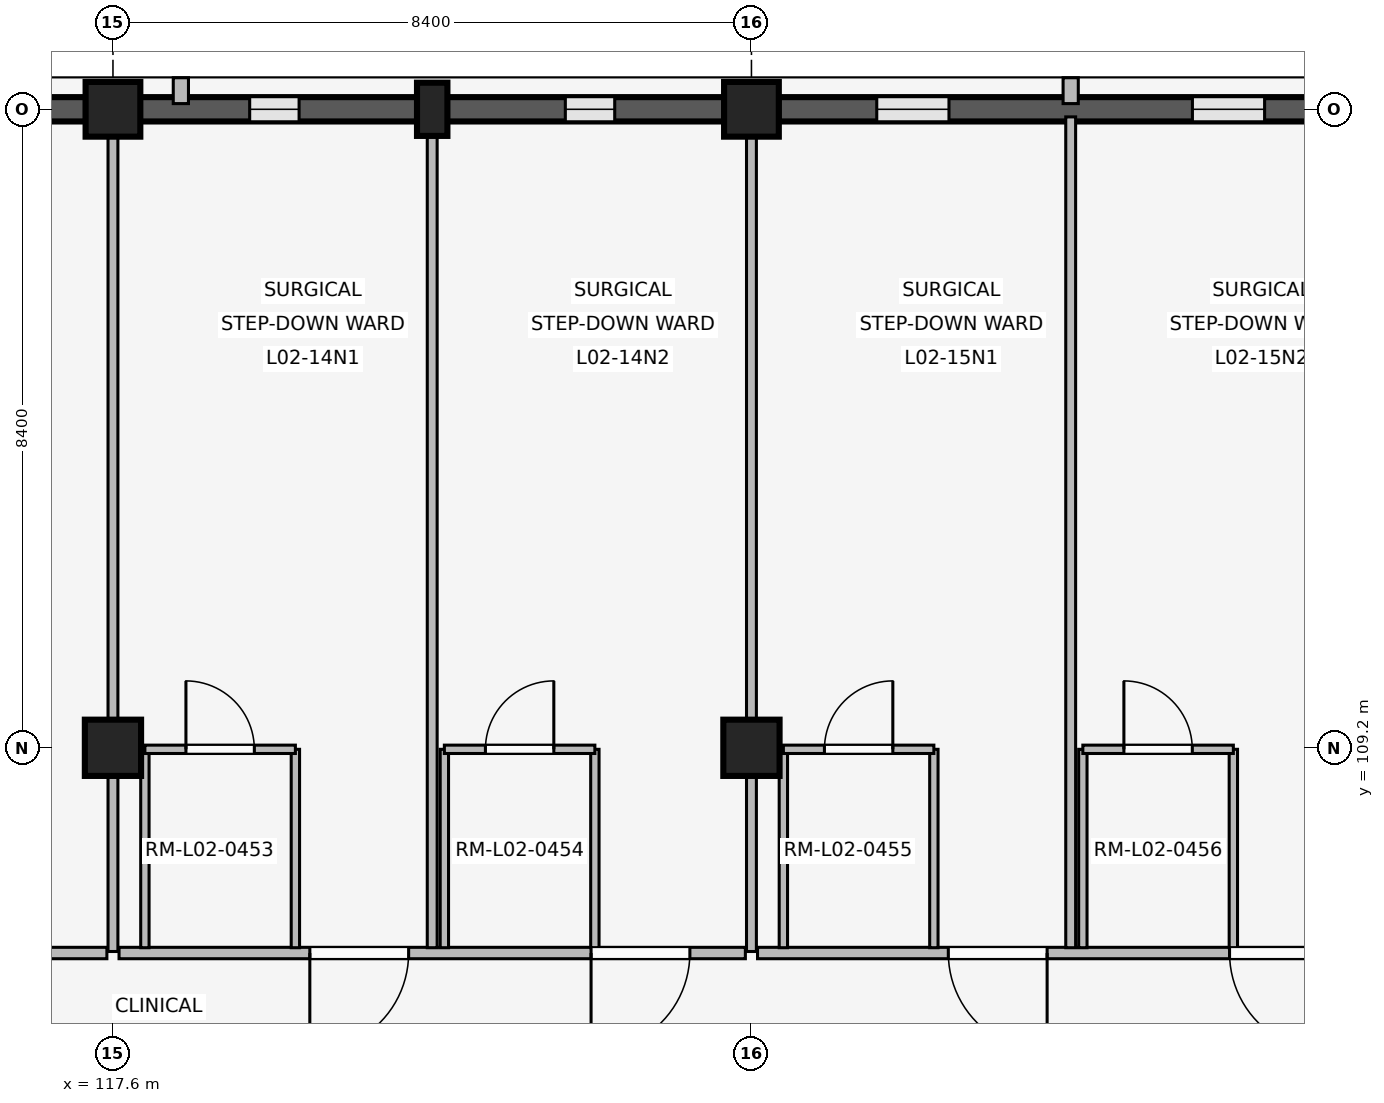
"""IFC4 building model, lengths in metres.
Left out: names, types, materials, properties, quantities, classifications, styles, units other than length and angle.
Written with IfcOpenShell. Run it as: python <this file> out.ifc"""

import sys

from ifc_helpers import new_model, si_unit, direction, frame, frame_2d, origin, origin_2d, place, context, subcontext, project, spatial, rectangle, extrude, element, fill, save


model = new_model("IFC4")
c1 = context("Model", 3, precision=1e-05, world=origin(), true_north=direction((0.0, 1.0)))
c2 = subcontext(c1, "Body", "Model", "MODEL_VIEW")
j1 = project(units=[si_unit("LENGTHUNIT", "METRE"), si_unit("PLANEANGLEUNIT", "RADIAN")], contexts=[c1])
p1 = place(None, origin())
s1 = spatial("IfcSite", under=j1, at=p1, CompositionType="ELEMENT")
p2 = place(p1, origin())
s2 = spatial("IfcBuilding", under=s1, at=p2, CompositionType="ELEMENT")
p3 = place(p2, frame((0.0, 0.0, 8.1)))
s3 = spatial("IfcBuildingStorey", under=s2, at=p3, CompositionType="ELEMENT", Elevation=8.1)
p4 = place(p3, frame((117.6, 109.2, 0.0), z_axis=(0.0, 0.0, 1.0), x_axis=(1.0, 0.0, 0.0)))
e1 = element("IfcColumn", 1, at=p4, inside=s3, PredefinedType="COLUMN", context=c2, shape_type="SweptSolid", body=[
    extrude(rectangle(XDim=0.74, YDim=0.74, at=origin_2d()), origin(), (0.0, 0.0, 1.0), 4.8),
])
p5 = place(p3, frame((117.6, 117.6, 0.0), z_axis=(0.0, 0.0, 1.0), x_axis=(1.0, 0.0, 0.0)))
e2 = element("IfcColumn", 2, at=p5, inside=s3, PredefinedType="COLUMN", context=c2, shape_type="SweptSolid", body=[
    extrude(rectangle(XDim=0.72, YDim=0.72, at=origin_2d()), origin(), (0.0, 0.0, 1.0), 4.8),
])
p6 = place(p3, frame((126.0, 109.2, 0.0), z_axis=(0.0, 0.0, 1.0), x_axis=(1.0, 0.0, 0.0)))
e3 = element("IfcColumn", 3, at=p6, inside=s3, PredefinedType="COLUMN", context=c2, shape_type="SweptSolid", body=[
    extrude(rectangle(XDim=0.74, YDim=0.74, at=origin_2d()), origin(), (0.0, 0.0, 1.0), 4.8),
])
p7 = place(p3, frame((126.0, 117.6, 0.0), z_axis=(0.0, 0.0, 1.0), x_axis=(1.0, 0.0, 0.0)))
e4 = element("IfcColumn", 4, at=p7, inside=s3, PredefinedType="COLUMN", context=c2, shape_type="SweptSolid", body=[
    extrude(rectangle(XDim=0.72, YDim=0.72, at=origin_2d()), origin(), (0.0, 0.0, 1.0), 4.8),
])
p8 = place(p3, frame((121.8, 117.6, 0.0), z_axis=(0.0, 0.0, 1.0), x_axis=(1.0, 0.0, 0.0)))
e5 = element("IfcColumn", 5, at=p8, inside=s3, PredefinedType="PILASTER", context=c2, shape_type="SweptSolid", body=[
    extrude(rectangle(XDim=0.4, YDim=0.7, at=origin_2d()), origin(), (0.0, 0.0, 1.0), 4.8),
])
p9 = place(p3, frame((109.555, 117.6, 0.0), z_axis=(0.0, 0.0, 1.0), x_axis=(1.0, 0.0, 0.0)))
e6 = element("IfcWall", 6, at=p9, inside=s3, PredefinedType="SOLIDWALL", context=c2, shape_type="SweptSolid", body=[
    extrude(rectangle(XDim=7.69, YDim=0.32, at=frame_2d((3.845, 0.0))), origin(), (0.0, 0.0, 1.0), 3.86),
])
p10 = place(p9, frame((1.394, 0.0, 0.85)))
e7 = element("IfcOpeningElement", 7, at=p10, cuts=e6, PredefinedType="OPENING", context=c2, shape_type="SweptSolid", body=[
    extrude(rectangle(XDim=0.75, YDim=1.85, at=frame_2d((0.375, 0.925))), frame((0.0, 0.17, 0.0), z_axis=(0.0, -1.0, 0.0), x_axis=(1.0, 0.0, 0.0)), (0.0, 0.0, 1.0), 0.34),
])
p11 = place(p9, frame((5.546, 0.0, 0.85)))
e8 = element("IfcOpeningElement", 8, at=p11, cuts=e6, PredefinedType="OPENING", context=c2, shape_type="SweptSolid", body=[
    extrude(rectangle(XDim=0.75, YDim=1.85, at=frame_2d((0.375, 0.925))), frame((0.0, 0.17, 0.0), z_axis=(0.0, -1.0, 0.0), x_axis=(1.0, 0.0, 0.0)), (0.0, 0.0, 1.0), 0.34),
])
p12 = place(p3, frame((117.955, 117.6, 0.0), z_axis=(0.0, 0.0, 1.0), x_axis=(1.0, 0.0, 0.0)))
e9 = element("IfcWall", 9, at=p12, inside=s3, PredefinedType="SOLIDWALL", context=c2, shape_type="SweptSolid", body=[
    extrude(rectangle(XDim=7.69, YDim=0.32, at=frame_2d((3.845, 0.0))), origin(), (0.0, 0.0, 1.0), 3.86),
])
p13 = place(p12, frame((1.444, 0.0, 0.85)))
e10 = element("IfcOpeningElement", 10, at=p13, cuts=e9, PredefinedType="OPENING", context=c2, shape_type="SweptSolid", body=[
    extrude(rectangle(XDim=0.65, YDim=1.75, at=frame_2d((0.325, 0.875))), frame((0.0, 0.17, 0.0), z_axis=(0.0, -1.0, 0.0), x_axis=(1.0, 0.0, 0.0)), (0.0, 0.0, 1.0), 0.34),
])
p14 = place(p12, frame((5.596, 0.0, 0.85)))
e11 = element("IfcOpeningElement", 11, at=p14, cuts=e9, PredefinedType="OPENING", context=c2, shape_type="SweptSolid", body=[
    extrude(rectangle(XDim=0.65, YDim=1.75, at=frame_2d((0.325, 0.875))), frame((0.0, 0.17, 0.0), z_axis=(0.0, -1.0, 0.0), x_axis=(1.0, 0.0, 0.0)), (0.0, 0.0, 1.0), 0.34),
])
p15 = place(p3, frame((118.493, 117.675, 0.0), z_axis=(0.0, 0.0, 1.0), x_axis=(0.0, 1.0, 0.0)))
e12 = element("IfcWall", 12, at=p15, inside=s3, PredefinedType="ELEMENTEDWALL", context=c2, shape_type="SweptSolid", body=[
    extrude(rectangle(XDim=0.34, YDim=0.2, at=frame_2d((0.17, 0.0))), origin(), (0.0, 0.0, 1.0), 3.84),
])
p16 = place(p3, frame((126.355, 117.6, 0.0), z_axis=(0.0, 0.0, 1.0), x_axis=(1.0, 0.0, 0.0)))
e13 = element("IfcWall", 13, at=p16, inside=s3, PredefinedType="SOLIDWALL", context=c2, shape_type="SweptSolid", body=[
    extrude(rectangle(XDim=7.69, YDim=0.32, at=frame_2d((3.845, 0.0))), origin(), (0.0, 0.0, 1.0), 3.86),
])
p17 = place(p16, frame((1.294, 0.0, 0.85)))
e14 = element("IfcOpeningElement", 14, at=p17, cuts=e13, PredefinedType="OPENING", context=c2, shape_type="SweptSolid", body=[
    extrude(rectangle(XDim=0.95, YDim=1.6, at=frame_2d((0.475, 0.8))), frame((0.0, 0.17, 0.0), z_axis=(0.0, -1.0, 0.0), x_axis=(1.0, 0.0, 0.0)), (0.0, 0.0, 1.0), 0.34),
])
p18 = place(p16, frame((5.446, 0.0, 0.85)))
e15 = element("IfcOpeningElement", 15, at=p18, cuts=e13, PredefinedType="OPENING", context=c2, shape_type="SweptSolid", body=[
    extrude(rectangle(XDim=0.95, YDim=1.6, at=frame_2d((0.475, 0.8))), frame((0.0, 0.17, 0.0), z_axis=(0.0, -1.0, 0.0), x_axis=(1.0, 0.0, 0.0)), (0.0, 0.0, 1.0), 0.34),
])
p19 = place(p3, frame((130.2, 117.675, 0.0), z_axis=(0.0, 0.0, 1.0), x_axis=(0.0, 1.0, 0.0)))
e16 = element("IfcWall", 16, at=p19, inside=s3, PredefinedType="ELEMENTEDWALL", context=c2, shape_type="SweptSolid", body=[
    extrude(rectangle(XDim=0.34, YDim=0.2, at=frame_2d((0.17, 0.0))), origin(), (0.0, 0.0, 1.0), 3.84),
])
p20 = place(p3, frame((117.52, 106.5, 0.0), z_axis=(0.0, 0.0, 1.0), x_axis=(-1.0, 0.0, 0.0)))
e17 = element("IfcWall", 17, at=p20, inside=s3, PredefinedType="PARTITIONING", context=c2, shape_type="SweptSolid", body=[
    extrude(rectangle(XDim=8.24, YDim=0.15, at=frame_2d((4.12, 0.0))), origin(), (0.0, 0.0, 1.0), 3.84),
])
p21 = place(p20, frame((3.37, 0.0, 0.0)))
e18 = element("IfcOpeningElement", 18, at=p21, cuts=e17, PredefinedType="OPENING", context=c2, shape_type="SweptSolid", body=[
    extrude(rectangle(XDim=1.5, YDim=2.3, at=frame_2d((0.75, 1.15))), frame((0.0, 0.085, 0.0), z_axis=(0.0, -1.0, 0.0), x_axis=(1.0, 0.0, 0.0)), (0.0, 0.0, 1.0), 0.17),
])
p22 = place(p3, frame((117.6, 106.52, 0.0), z_axis=(0.0, 0.0, 1.0), x_axis=(0.0, 1.0, 0.0)))
e19 = element("IfcWall", 19, at=p22, inside=s3, PredefinedType="PARTITIONING", context=c2, shape_type="SweptSolid", body=[
    extrude(rectangle(XDim=10.94, YDim=0.13, at=frame_2d((5.47, 0.0))), origin(), (0.0, 0.0, 1.0), 3.84),
])
p23 = place(p3, frame((125.92, 106.5, 0.0), z_axis=(0.0, 0.0, 1.0), x_axis=(-1.0, 0.0, 0.0)))
e20 = element("IfcWall", 20, at=p23, inside=s3, PredefinedType="PARTITIONING", context=c2, shape_type="SweptSolid", body=[
    extrude(rectangle(XDim=8.24, YDim=0.15, at=frame_2d((4.12, 0.0))), origin(), (0.0, 0.0, 1.0), 3.84),
])
p24 = place(p23, frame((0.73, 0.0, 0.0)))
e21 = element("IfcOpeningElement", 21, at=p24, cuts=e20, PredefinedType="OPENING", context=c2, shape_type="SweptSolid", body=[
    extrude(rectangle(XDim=1.3, YDim=2.25, at=frame_2d((0.65, 1.125))), frame((0.0, 0.085, 0.0), z_axis=(0.0, -1.0, 0.0), x_axis=(1.0, 0.0, 0.0)), (0.0, 0.0, 1.0), 0.17),
])
p25 = place(p23, frame((4.43, 0.0, 0.0)))
e22 = element("IfcOpeningElement", 22, at=p25, cuts=e20, PredefinedType="OPENING", context=c2, shape_type="SweptSolid", body=[
    extrude(rectangle(XDim=1.3, YDim=2.25, at=frame_2d((0.65, 1.125))), frame((0.0, 0.085, 0.0), z_axis=(0.0, -1.0, 0.0), x_axis=(1.0, 0.0, 0.0)), (0.0, 0.0, 1.0), 0.17),
])
p26 = place(p3, frame((121.8, 106.57, 0.0), z_axis=(0.0, 0.0, 1.0), x_axis=(0.0, 1.0, 0.0)))
e23 = element("IfcWall", 23, at=p26, inside=s3, PredefinedType="PARTITIONING", context=c2, shape_type="SweptSolid", body=[
    extrude(rectangle(XDim=10.93, YDim=0.13, at=frame_2d((5.465, 0.0))), origin(), (0.0, 0.0, 1.0), 3.84),
])
for number, where, z_axis, x_axis in (
    (24, (118.02, 106.57, 0.0), (0.0, 0.0, 1.0), (0.0, 1.0, 0.0)),
    (25, (120.0, 106.57, 0.0), (0.0, 0.0, 1.0), (0.0, 1.0, 0.0)),
):
    element("IfcWall", number, at=place(p3, frame(where, z_axis=z_axis, x_axis=x_axis)), inside=s3, PredefinedType="PARTITIONING", context=c2, shape_type="SweptSolid", body=[
        extrude(rectangle(XDim=2.61, YDim=0.11, at=frame_2d((1.305, 0.0))), origin(), (0.0, 0.0, 1.0), 3.84),
    ])
p27 = place(p3, frame((118.02, 109.18, 0.0), z_axis=(0.0, 0.0, 1.0), x_axis=(1.0, 0.0, 0.0)))
e26 = element("IfcWall", 26, at=p27, inside=s3, PredefinedType="PARTITIONING", context=c2, shape_type="SweptSolid", body=[
    extrude(rectangle(XDim=1.98, YDim=0.11, at=frame_2d((0.99, 0.0))), origin(), (0.0, 0.0, 1.0), 3.84),
])
p28 = place(p27, frame((0.54, 0.0, 0.0)))
e27 = element("IfcOpeningElement", 27, at=p28, cuts=e26, PredefinedType="OPENING", context=c2, shape_type="SweptSolid", body=[
    extrude(rectangle(XDim=0.9, YDim=2.1, at=frame_2d((0.45, 1.05))), frame((0.0, 0.065, 0.0), z_axis=(0.0, -1.0, 0.0), x_axis=(1.0, 0.0, 0.0)), (0.0, 0.0, 1.0), 0.13),
])
for number, where, z_axis, x_axis in (
    (28, (121.96, 106.57, 0.0), (0.0, 0.0, 1.0), (0.0, 1.0, 0.0)),
    (29, (123.94, 106.57, 0.0), (0.0, 0.0, 1.0), (0.0, 1.0, 0.0)),
):
    element("IfcWall", number, at=place(p3, frame(where, z_axis=z_axis, x_axis=x_axis)), inside=s3, PredefinedType="PARTITIONING", context=c2, shape_type="SweptSolid", body=[
        extrude(rectangle(XDim=2.61, YDim=0.11, at=frame_2d((1.305, 0.0))), origin(), (0.0, 0.0, 1.0), 3.84),
    ])
p29 = place(p3, frame((121.96, 109.18, 0.0), z_axis=(0.0, 0.0, 1.0), x_axis=(1.0, 0.0, 0.0)))
e30 = element("IfcWall", 30, at=p29, inside=s3, PredefinedType="PARTITIONING", context=c2, shape_type="SweptSolid", body=[
    extrude(rectangle(XDim=1.98, YDim=0.11, at=frame_2d((0.99, 0.0))), origin(), (0.0, 0.0, 1.0), 3.84),
])
p30 = place(p29, frame((0.54, 0.0, 0.0)))
e31 = element("IfcOpeningElement", 31, at=p30, cuts=e30, PredefinedType="OPENING", context=c2, shape_type="SweptSolid", body=[
    extrude(rectangle(XDim=0.9, YDim=2.1, at=frame_2d((0.45, 1.05))), frame((0.0, 0.065, 0.0), z_axis=(0.0, -1.0, 0.0), x_axis=(1.0, 0.0, 0.0)), (0.0, 0.0, 1.0), 0.13),
])
p31 = place(p3, frame((126.0, 106.52, 0.0), z_axis=(0.0, 0.0, 1.0), x_axis=(0.0, 1.0, 0.0)))
e32 = element("IfcWall", 32, at=p31, inside=s3, PredefinedType="PARTITIONING", context=c2, shape_type="SweptSolid", body=[
    extrude(rectangle(XDim=10.94, YDim=0.13, at=frame_2d((5.47, 0.0))), origin(), (0.0, 0.0, 1.0), 3.84),
])
p32 = place(p3, frame((134.26, 106.5, 0.0), z_axis=(0.0, 0.0, 1.0), x_axis=(-1.0, 0.0, 0.0)))
e33 = element("IfcWall", 33, at=p32, inside=s3, PredefinedType="PARTITIONING", context=c2, shape_type="SweptSolid", body=[
    extrude(rectangle(XDim=8.18, YDim=0.15, at=frame_2d((4.09, 0.0))), origin(), (0.0, 0.0, 1.0), 3.84),
])
p33 = place(p32, frame((0.67, 0.0, 0.0)))
e34 = element("IfcOpeningElement", 34, at=p33, cuts=e33, PredefinedType="OPENING", context=c2, shape_type="SweptSolid", body=[
    extrude(rectangle(XDim=1.3, YDim=2.25, at=frame_2d((0.65, 1.125))), frame((0.0, 0.085, 0.0), z_axis=(0.0, -1.0, 0.0), x_axis=(1.0, 0.0, 0.0)), (0.0, 0.0, 1.0), 0.17),
])
p34 = place(p32, frame((4.37, 0.0, 0.0)))
e35 = element("IfcOpeningElement", 35, at=p34, cuts=e33, PredefinedType="OPENING", context=c2, shape_type="SweptSolid", body=[
    extrude(rectangle(XDim=1.3, YDim=2.25, at=frame_2d((0.65, 1.125))), frame((0.0, 0.085, 0.0), z_axis=(0.0, -1.0, 0.0), x_axis=(1.0, 0.0, 0.0)), (0.0, 0.0, 1.0), 0.17),
])
p35 = place(p3, frame((130.2, 106.57, 0.0), z_axis=(0.0, 0.0, 1.0), x_axis=(0.0, 1.0, 0.0)))
e36 = element("IfcWall", 36, at=p35, inside=s3, PredefinedType="PARTITIONING", context=c2, shape_type="SweptSolid", body=[
    extrude(rectangle(XDim=10.93, YDim=0.13, at=frame_2d((5.465, 0.0))), origin(), (0.0, 0.0, 1.0), 3.84),
])
for number, where, z_axis, x_axis in (
    (37, (126.42, 106.57, 0.0), (0.0, 0.0, 1.0), (0.0, 1.0, 0.0)),
    (38, (128.4, 106.57, 0.0), (0.0, 0.0, 1.0), (0.0, 1.0, 0.0)),
):
    element("IfcWall", number, at=place(p3, frame(where, z_axis=z_axis, x_axis=x_axis)), inside=s3, PredefinedType="PARTITIONING", context=c2, shape_type="SweptSolid", body=[
        extrude(rectangle(XDim=2.61, YDim=0.11, at=frame_2d((1.305, 0.0))), origin(), (0.0, 0.0, 1.0), 3.84),
    ])
p36 = place(p3, frame((126.42, 109.18, 0.0), z_axis=(0.0, 0.0, 1.0), x_axis=(1.0, 0.0, 0.0)))
e39 = element("IfcWall", 39, at=p36, inside=s3, PredefinedType="PARTITIONING", context=c2, shape_type="SweptSolid", body=[
    extrude(rectangle(XDim=1.98, YDim=0.11, at=frame_2d((0.99, 0.0))), origin(), (0.0, 0.0, 1.0), 3.84),
])
p37 = place(p36, frame((0.54, 0.0, 0.0)))
e40 = element("IfcOpeningElement", 40, at=p37, cuts=e39, PredefinedType="OPENING", context=c2, shape_type="SweptSolid", body=[
    extrude(rectangle(XDim=0.9, YDim=2.1, at=frame_2d((0.45, 1.05))), frame((0.0, 0.065, 0.0), z_axis=(0.0, -1.0, 0.0), x_axis=(1.0, 0.0, 0.0)), (0.0, 0.0, 1.0), 0.13),
])
for number, where, z_axis, x_axis in (
    (41, (130.36, 106.57, 0.0), (0.0, 0.0, 1.0), (0.0, 1.0, 0.0)),
    (42, (132.34, 106.57, 0.0), (0.0, 0.0, 1.0), (0.0, 1.0, 0.0)),
):
    element("IfcWall", number, at=place(p3, frame(where, z_axis=z_axis, x_axis=x_axis)), inside=s3, PredefinedType="PARTITIONING", context=c2, shape_type="SweptSolid", body=[
        extrude(rectangle(XDim=2.61, YDim=0.11, at=frame_2d((1.305, 0.0))), origin(), (0.0, 0.0, 1.0), 3.84),
    ])
p38 = place(p3, frame((130.36, 109.18, 0.0), z_axis=(0.0, 0.0, 1.0), x_axis=(1.0, 0.0, 0.0)))
e43 = element("IfcWall", 43, at=p38, inside=s3, PredefinedType="PARTITIONING", context=c2, shape_type="SweptSolid", body=[
    extrude(rectangle(XDim=1.98, YDim=0.11, at=frame_2d((0.99, 0.0))), origin(), (0.0, 0.0, 1.0), 3.84),
])
p39 = place(p38, frame((0.54, 0.0, 0.0)))
e44 = element("IfcOpeningElement", 44, at=p39, cuts=e43, PredefinedType="OPENING", context=c2, shape_type="SweptSolid", body=[
    extrude(rectangle(XDim=0.9, YDim=2.1, at=frame_2d((0.45, 1.05))), frame((0.0, 0.065, 0.0), z_axis=(0.0, -1.0, 0.0), x_axis=(1.0, 0.0, 0.0)), (0.0, 0.0, 1.0), 0.13),
])
p40 = place(p13, origin())
e45 = element("IfcWindow", 45, at=p40, inside=s3, PartitioningType="SINGLE_PANEL", PredefinedType="WINDOW", context=c2, shape_type="SweptSolid", body=[
    extrude(rectangle(XDim=0.65, YDim=1.75, at=frame_2d((0.325, 0.875))), frame((0.0, 0.03, 0.0), z_axis=(0.0, -1.0, 0.0), x_axis=(1.0, 0.0, 0.0)), (0.0, 0.0, 1.0), 0.06),
])
fill(e10, e45)
p41 = place(p14, origin())
e46 = element("IfcWindow", 46, at=p41, inside=s3, PartitioningType="SINGLE_PANEL", PredefinedType="WINDOW", context=c2, shape_type="SweptSolid", body=[
    extrude(rectangle(XDim=0.65, YDim=1.75, at=frame_2d((0.325, 0.875))), frame((0.0, 0.03, 0.0), z_axis=(0.0, -1.0, 0.0), x_axis=(1.0, 0.0, 0.0)), (0.0, 0.0, 1.0), 0.06),
])
fill(e11, e46)
p42 = place(p17, origin())
e47 = element("IfcWindow", 47, at=p42, inside=s3, PartitioningType="SINGLE_PANEL", PredefinedType="WINDOW", context=c2, shape_type="SweptSolid", body=[
    extrude(rectangle(XDim=0.95, YDim=1.6, at=frame_2d((0.475, 0.8))), frame((0.0, 0.03, 0.0), z_axis=(0.0, -1.0, 0.0), x_axis=(1.0, 0.0, 0.0)), (0.0, 0.0, 1.0), 0.06),
])
fill(e14, e47)
p43 = place(p18, origin())
e48 = element("IfcWindow", 48, at=p43, inside=s3, PartitioningType="SINGLE_PANEL", PredefinedType="WINDOW", context=c2, shape_type="SweptSolid", body=[
    extrude(rectangle(XDim=0.95, YDim=1.6, at=frame_2d((0.475, 0.8))), frame((0.0, 0.03, 0.0), z_axis=(0.0, -1.0, 0.0), x_axis=(1.0, 0.0, 0.0)), (0.0, 0.0, 1.0), 0.06),
])
fill(e15, e48)
p44 = place(p24, origin())
e49 = element("IfcDoor", 49, at=p44, inside=s3, OperationType="SINGLE_SWING_RIGHT", PredefinedType="DOOR", context=c2, shape_type="SweptSolid", body=[
    extrude(rectangle(XDim=1.3, YDim=2.25, at=frame_2d((0.65, 1.125))), frame((0.0, 0.025, 0.0), z_axis=(0.0, -1.0, 0.0), x_axis=(1.0, 0.0, 0.0)), (0.0, 0.0, 1.0), 0.05),
])
fill(e21, e49)
p45 = place(p25, origin())
e50 = element("IfcDoor", 50, at=p45, inside=s3, OperationType="SINGLE_SWING_RIGHT", PredefinedType="DOOR", context=c2, shape_type="SweptSolid", body=[
    extrude(rectangle(XDim=1.3, YDim=2.25, at=frame_2d((0.65, 1.125))), frame((0.0, 0.025, 0.0), z_axis=(0.0, -1.0, 0.0), x_axis=(1.0, 0.0, 0.0)), (0.0, 0.0, 1.0), 0.05),
])
fill(e22, e50)
p46 = place(p28, origin())
e51 = element("IfcDoor", 51, at=p46, inside=s3, OperationType="SINGLE_SWING_LEFT", PredefinedType="DOOR", context=c2, shape_type="SweptSolid", body=[
    extrude(rectangle(XDim=0.9, YDim=2.1, at=frame_2d((0.45, 1.05))), frame((0.0, 0.025, 0.0), z_axis=(0.0, -1.0, 0.0), x_axis=(1.0, 0.0, 0.0)), (0.0, 0.0, 1.0), 0.05),
])
fill(e27, e51)
p47 = place(p30, origin())
e52 = element("IfcDoor", 52, at=p47, inside=s3, OperationType="SINGLE_SWING_RIGHT", PredefinedType="DOOR", context=c2, shape_type="SweptSolid", body=[
    extrude(rectangle(XDim=0.9, YDim=2.1, at=frame_2d((0.45, 1.05))), frame((0.0, 0.025, 0.0), z_axis=(0.0, -1.0, 0.0), x_axis=(1.0, 0.0, 0.0)), (0.0, 0.0, 1.0), 0.05),
])
fill(e31, e52)
p48 = place(p33, origin())
e53 = element("IfcDoor", 53, at=p48, inside=s3, OperationType="SINGLE_SWING_LEFT", PredefinedType="DOOR", context=c2, shape_type="SweptSolid", body=[
    extrude(rectangle(XDim=1.3, YDim=2.25, at=frame_2d((0.65, 1.125))), frame((0.0, 0.025, 0.0), z_axis=(0.0, -1.0, 0.0), x_axis=(1.0, 0.0, 0.0)), (0.0, 0.0, 1.0), 0.05),
])
fill(e34, e53)
p49 = place(p34, origin())
e54 = element("IfcDoor", 54, at=p49, inside=s3, OperationType="SINGLE_SWING_LEFT", PredefinedType="DOOR", context=c2, shape_type="SweptSolid", body=[
    extrude(rectangle(XDim=1.3, YDim=2.25, at=frame_2d((0.65, 1.125))), frame((0.0, 0.025, 0.0), z_axis=(0.0, -1.0, 0.0), x_axis=(1.0, 0.0, 0.0)), (0.0, 0.0, 1.0), 0.05),
])
fill(e35, e54)
p50 = place(p37, origin())
e55 = element("IfcDoor", 55, at=p50, inside=s3, OperationType="SINGLE_SWING_RIGHT", PredefinedType="DOOR", context=c2, shape_type="SweptSolid", body=[
    extrude(rectangle(XDim=0.9, YDim=2.1, at=frame_2d((0.45, 1.05))), frame((0.0, 0.025, 0.0), z_axis=(0.0, -1.0, 0.0), x_axis=(1.0, 0.0, 0.0)), (0.0, 0.0, 1.0), 0.05),
])
fill(e40, e55)
p51 = place(p39, origin())
e56 = element("IfcDoor", 56, at=p51, inside=s3, OperationType="SINGLE_SWING_LEFT", PredefinedType="DOOR", context=c2, shape_type="SweptSolid", body=[
    extrude(rectangle(XDim=0.9, YDim=2.1, at=frame_2d((0.45, 1.05))), frame((0.0, 0.025, 0.0), z_axis=(0.0, -1.0, 0.0), x_axis=(1.0, 0.0, 0.0)), (0.0, 0.0, 1.0), 0.05),
])
fill(e44, e56)
save(model, sys.argv[1])
